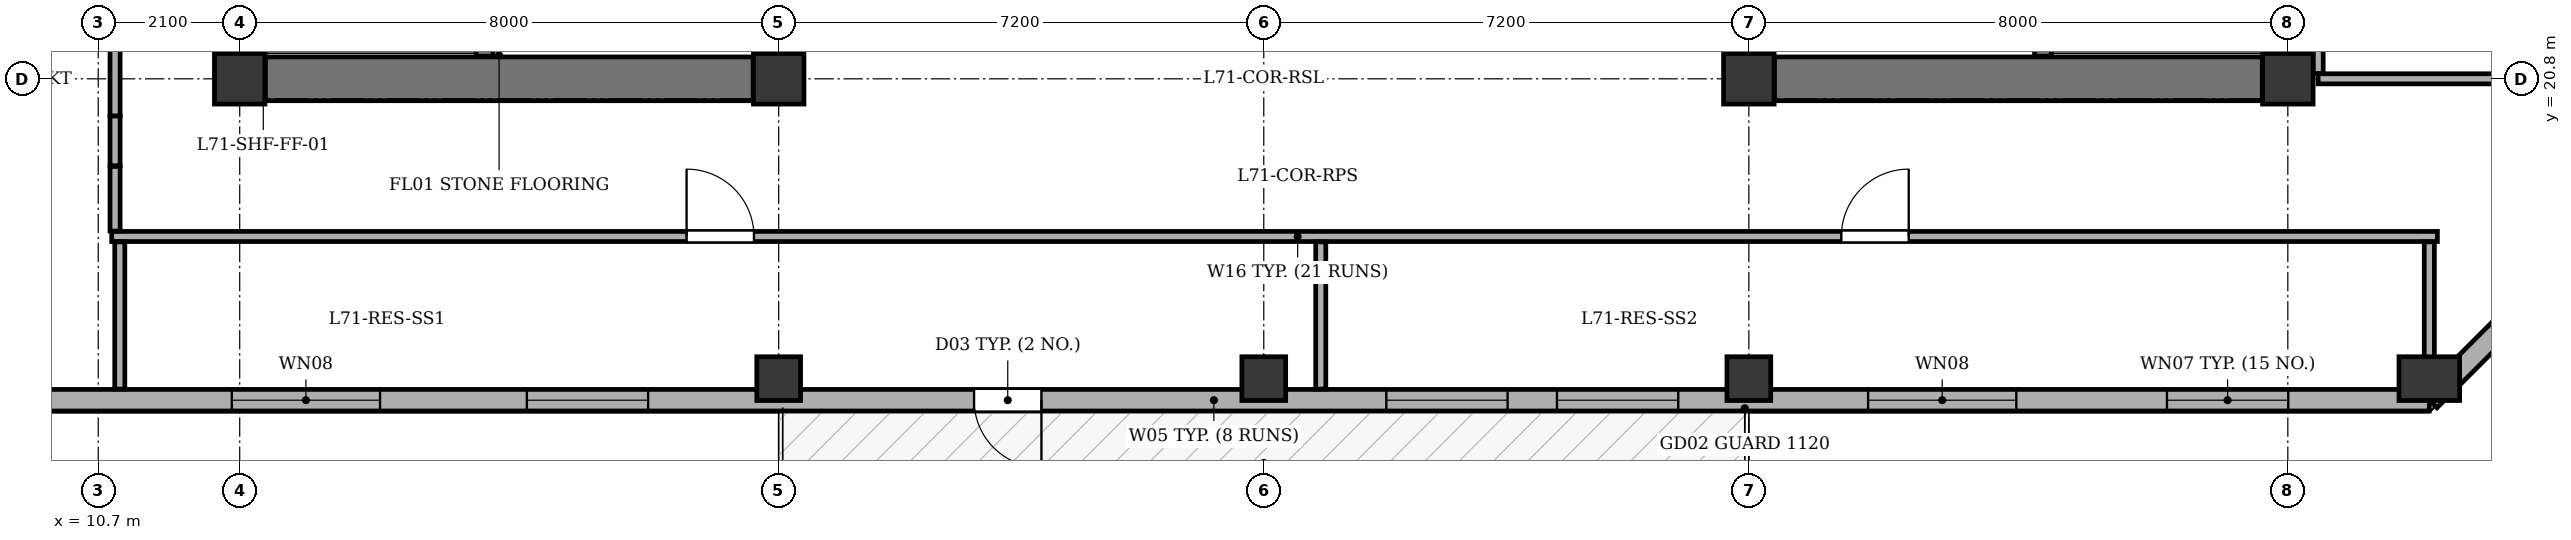
"""IFC4 building model, lengths in metres.
Left out: names, types, materials, properties, quantities, classifications, styles, units other than length and angle.
Written with IfcOpenShell. Run it as: python <this file> out.ifc"""

import sys

from ifc_helpers import new_model, si_unit, direction, frame, frame_2d, origin, origin_2d, place, context, subcontext, project, spatial, rectangle, extrude, element, fill, save


model = new_model("IFC4")
c1 = context("Model", 3, precision=1e-05, world=origin(), true_north=direction((0.0, 1.0)))
c2 = subcontext(c1, "Body", "Model", "MODEL_VIEW")
j1 = project(units=[si_unit("LENGTHUNIT", "METRE"), si_unit("PLANEANGLEUNIT", "RADIAN")], contexts=[c1])
p1 = place(None, origin())
s1 = spatial("IfcSite", under=j1, at=p1, CompositionType="ELEMENT")
p2 = place(p1, origin())
s2 = spatial("IfcBuilding", under=s1, at=p2, CompositionType="ELEMENT")
p3 = place(p2, frame((0.0, 0.0, 268.7)))
s3 = spatial("IfcBuildingStorey", under=s2, at=p3, CompositionType="ELEMENT", Elevation=268.7)
for number, where, z_axis, x_axis in (
    (1, (12.8, 20.8, 0.0), (0.0, 0.0, 1.0), (1.0, 0.0, 0.0)),
    (2, (20.8, 20.8, 0.0), (0.0, 0.0, 1.0), (1.0, 0.0, 0.0)),
    (3, (35.2, 20.8, 0.0), (0.0, 0.0, 1.0), (1.0, 0.0, 0.0)),
    (4, (43.2, 20.8, 0.0), (0.0, 0.0, 1.0), (1.0, 0.0, 0.0)),
):
    element("IfcColumn", number, at=place(p3, frame(where, z_axis=z_axis, x_axis=x_axis)), inside=s3, PredefinedType="COLUMN", context=c2, shape_type="SweptSolid", body=[
        extrude(rectangle(XDim=0.75, YDim=0.75, at=origin_2d()), origin(), (0.0, 0.0, 1.0), 3.4),
    ])
for number, where, z_axis, x_axis in (
    (5, (20.8, 16.35, 0.0), (0.0, 0.0, 1.0), (1.0, 0.0, 0.0)),
    (6, (28.0, 16.35, 0.0), (0.0, 0.0, 1.0), (1.0, 0.0, 0.0)),
    (7, (35.2, 16.35, 0.0), (0.0, 0.0, 1.0), (1.0, 0.0, 0.0)),
):
    element("IfcColumn", number, at=place(p3, frame(where, z_axis=z_axis, x_axis=x_axis)), inside=s3, PredefinedType="COLUMN", context=c2, shape_type="SweptSolid", body=[
        extrude(rectangle(XDim=0.65, YDim=0.65, at=origin_2d()), origin(), (0.0, 0.0, 1.0), 3.4),
    ])
p4 = place(p3, frame((45.3, 16.35, 0.0), z_axis=(0.0, 0.0, 1.0), x_axis=(1.0, 0.0, 0.0)))
e8 = element("IfcColumn", 8, at=p4, inside=s3, PredefinedType="COLUMN", context=c2, shape_type="SweptSolid", body=[
    extrude(rectangle(XDim=0.65, YDim=0.9, at=origin_2d()), origin(), (0.0, 0.0, 1.0), 3.4),
])
p5 = place(p3, frame((45.3, 16.03, 0.0), z_axis=(0.0, 0.0, 1.0), x_axis=(-1.0, 0.0, 0.0)))
e9 = element("IfcWall", 9, at=p5, inside=s3, PredefinedType="STANDARD", context=c2, shape_type="SweptSolid", body=[
    extrude(rectangle(XDim=37.0, YDim=0.32, at=frame_2d((18.5, 0.0))), origin(), (0.0, 0.0, 1.0), 2.725),
])
p6 = place(p5, frame((20.6, 0.0, 0.0)))
e10 = element("IfcOpeningElement", 10, at=p6, cuts=e9, PredefinedType="OPENING", context=c2, shape_type="SweptSolid", body=[
    extrude(rectangle(XDim=1.0, YDim=2.02, at=frame_2d((0.5, 1.01))), frame((0.0, 0.17, 0.0), z_axis=(0.0, -1.0, 0.0), x_axis=(1.0, 0.0, 0.0)), (0.0, 0.0, 1.0), 0.34),
])
p7 = place(p5, frame((2.094, 0.0, 0.75)))
e11 = element("IfcOpeningElement", 11, at=p7, cuts=e9, PredefinedType="OPENING", context=c2, shape_type="SweptSolid", body=[
    extrude(rectangle(XDim=1.8, YDim=1.7, at=frame_2d((0.9, 0.85))), frame((0.0, 0.17, 0.0), z_axis=(0.0, -1.0, 0.0), x_axis=(1.0, 0.0, 0.0)), (0.0, 0.0, 1.0), 0.34),
])
p8 = place(p5, frame((6.13, 0.0, 0.75)))
e12 = element("IfcOpeningElement", 12, at=p8, cuts=e9, PredefinedType="OPENING", context=c2, shape_type="SweptSolid", body=[
    extrude(rectangle(XDim=2.2, YDim=1.7, at=frame_2d((1.1, 0.85))), frame((0.0, 0.17, 0.0), z_axis=(0.0, -1.0, 0.0), x_axis=(1.0, 0.0, 0.0)), (0.0, 0.0, 1.0), 0.34),
])
p9 = place(p5, frame((11.148, 0.0, 0.75)))
e13 = element("IfcOpeningElement", 13, at=p9, cuts=e9, PredefinedType="OPENING", context=c2, shape_type="SweptSolid", body=[
    extrude(rectangle(XDim=1.8, YDim=1.7, at=frame_2d((0.9, 0.85))), frame((0.0, 0.17, 0.0), z_axis=(0.0, -1.0, 0.0), x_axis=(1.0, 0.0, 0.0)), (0.0, 0.0, 1.0), 0.34),
])
p10 = place(p5, frame((13.681, 0.0, 0.75)))
e14 = element("IfcOpeningElement", 14, at=p10, cuts=e9, PredefinedType="OPENING", context=c2, shape_type="SweptSolid", body=[
    extrude(rectangle(XDim=1.8, YDim=1.7, at=frame_2d((0.9, 0.85))), frame((0.0, 0.17, 0.0), z_axis=(0.0, -1.0, 0.0), x_axis=(1.0, 0.0, 0.0)), (0.0, 0.0, 1.0), 0.34),
])
p11 = place(p5, frame((26.438, 0.0, 0.75)))
e15 = element("IfcOpeningElement", 15, at=p11, cuts=e9, PredefinedType="OPENING", context=c2, shape_type="SweptSolid", body=[
    extrude(rectangle(XDim=1.8, YDim=1.7, at=frame_2d((0.9, 0.85))), frame((0.0, 0.17, 0.0), z_axis=(0.0, -1.0, 0.0), x_axis=(1.0, 0.0, 0.0)), (0.0, 0.0, 1.0), 0.34),
])
p12 = place(p5, frame((30.417, 0.0, 0.75)))
e16 = element("IfcOpeningElement", 16, at=p12, cuts=e9, PredefinedType="OPENING", context=c2, shape_type="SweptSolid", body=[
    extrude(rectangle(XDim=2.2, YDim=1.7, at=frame_2d((1.1, 0.85))), frame((0.0, 0.17, 0.0), z_axis=(0.0, -1.0, 0.0), x_axis=(1.0, 0.0, 0.0)), (0.0, 0.0, 1.0), 0.34),
])
p13 = place(p3, frame((49.12, 19.85, 0.0), z_axis=(0.0, 0.0, 1.0), x_axis=(-0.707106781187, -0.707106781187, 0.0)))
e17 = element("IfcWall", 17, at=p13, inside=s3, PredefinedType="STANDARD", context=c2, shape_type="SweptSolid", body=[
    extrude(rectangle(XDim=5.402, YDim=0.32, at=frame_2d((2.701, 0.0))), origin(), (0.0, 0.0, 1.0), 2.725),
])
p14 = place(p13, frame((2.001, 0.0, 0.75)))
e18 = element("IfcOpeningElement", 18, at=p14, cuts=e17, PredefinedType="OPENING", context=c2, shape_type="SweptSolid", body=[
    extrude(rectangle(XDim=1.4, YDim=1.65, at=frame_2d((0.7, 0.825))), frame((0.0, 0.17, 0.0), z_axis=(0.0, -1.0, 0.0), x_axis=(1.0, 0.0, 0.0)), (0.0, 0.0, 1.0), 0.34),
])
p15 = place(p3, frame((12.8, 21.18, 0.0), z_axis=(0.0, 0.0, 1.0), x_axis=(0.0, 1.0, 0.0)))
e19 = element("IfcWall", 19, at=p15, inside=s3, PredefinedType="SHEAR", context=c2, shape_type="SweptSolid", body=[
    extrude(rectangle(XDim=12.04, YDim=0.65, at=frame_2d((6.02, 0.0))), origin(), (0.0, 0.0, 1.0), 3.1),
])
p16 = place(p3, frame((13.18, 20.8, 0.0), z_axis=(0.0, 0.0, 1.0), x_axis=(1.0, 0.0, 0.0)))
e20 = element("IfcWall", 20, at=p16, inside=s3, PredefinedType="SHEAR", context=c2, shape_type="SweptSolid", body=[
    extrude(rectangle(XDim=7.24, YDim=0.65, at=frame_2d((3.62, 0.0))), origin(), (0.0, 0.0, 1.0), 3.1),
])
p17 = place(p3, frame((20.8, 21.18, 0.0), z_axis=(0.0, 0.0, 1.0), x_axis=(0.0, 1.0, 0.0)))
e21 = element("IfcWall", 21, at=p17, inside=s3, PredefinedType="SHEAR", context=c2, shape_type="SweptSolid", body=[
    extrude(rectangle(XDim=3.87, YDim=0.65, at=frame_2d((1.935, 0.0))), origin(), (0.0, 0.0, 1.0), 3.1),
])
p18 = place(p17, frame((1.42, 0.0, 0.0)))
e22 = element("IfcOpeningElement", 22, at=p18, cuts=e21, PredefinedType="OPENING", context=c2, shape_type="SweptSolid", body=[
    extrude(rectangle(XDim=1.2, YDim=2.15, at=frame_2d((0.6, 1.075))), frame((0.0, 0.335, 0.0), z_axis=(0.0, -1.0, 0.0), x_axis=(1.0, 0.0, 0.0)), (0.0, 0.0, 1.0), 0.67),
])
p19 = place(p3, frame((16.435, 21.135, 0.0), z_axis=(0.0, 0.0, 1.0), x_axis=(0.0, 1.0, 0.0)))
e23 = element("IfcWall", 23, at=p19, inside=s3, PredefinedType="SHEAR", context=c2, shape_type="SweptSolid", body=[
    extrude(rectangle(XDim=12.13, YDim=0.25, at=frame_2d((6.065, 0.0))), origin(), (0.0, 0.0, 1.0), 3.1),
])
p20 = place(p19, frame((0.515, 0.0, 0.0)))
e24 = element("IfcOpeningElement", 24, at=p20, cuts=e23, PredefinedType="OPENING", context=c2, shape_type="SweptSolid", body=[
    extrude(rectangle(XDim=1.2, YDim=2.15, at=frame_2d((0.6, 1.075))), frame((0.0, 0.135, 0.0), z_axis=(0.0, -1.0, 0.0), x_axis=(1.0, 0.0, 0.0)), (0.0, 0.0, 1.0), 0.27),
])
p21 = place(p19, frame((2.665, 0.0, 0.0)))
e25 = element("IfcOpeningElement", 25, at=p21, cuts=e23, PredefinedType="OPENING", context=c2, shape_type="SweptSolid", body=[
    extrude(rectangle(XDim=1.15, YDim=2.15, at=frame_2d((0.575, 1.075))), frame((0.0, 0.135, 0.0), z_axis=(0.0, -1.0, 0.0), x_axis=(1.0, 0.0, 0.0)), (0.0, 0.0, 1.0), 0.27),
])
p22 = place(p3, frame((43.2, 21.18, 0.0), z_axis=(0.0, 0.0, 1.0), x_axis=(0.0, 1.0, 0.0)))
e26 = element("IfcWall", 26, at=p22, inside=s3, PredefinedType="SHEAR", context=c2, shape_type="SweptSolid", body=[
    extrude(rectangle(XDim=12.04, YDim=0.65, at=frame_2d((6.02, 0.0))), origin(), (0.0, 0.0, 1.0), 3.1),
])
p23 = place(p3, frame((35.58, 20.8, 0.0), z_axis=(0.0, 0.0, 1.0), x_axis=(1.0, 0.0, 0.0)))
e27 = element("IfcWall", 27, at=p23, inside=s3, PredefinedType="SHEAR", context=c2, shape_type="SweptSolid", body=[
    extrude(rectangle(XDim=7.24, YDim=0.65, at=frame_2d((3.62, 0.0))), origin(), (0.0, 0.0, 1.0), 3.1),
])
p24 = place(p3, frame((35.2, 21.18, 0.0), z_axis=(0.0, 0.0, 1.0), x_axis=(0.0, 1.0, 0.0)))
e28 = element("IfcWall", 28, at=p24, inside=s3, PredefinedType="SHEAR", context=c2, shape_type="SweptSolid", body=[
    extrude(rectangle(XDim=3.87, YDim=0.65, at=frame_2d((1.935, 0.0))), origin(), (0.0, 0.0, 1.0), 3.1),
])
p25 = place(p24, frame((1.42, 0.0, 0.0)))
e29 = element("IfcOpeningElement", 29, at=p25, cuts=e28, PredefinedType="OPENING", context=c2, shape_type="SweptSolid", body=[
    extrude(rectangle(XDim=1.2, YDim=2.15, at=frame_2d((0.6, 1.075))), frame((0.0, 0.335, 0.0), z_axis=(0.0, -1.0, 0.0), x_axis=(1.0, 0.0, 0.0)), (0.0, 0.0, 1.0), 0.67),
])
p26 = place(p3, frame((39.565, 21.135, 0.0), z_axis=(0.0, 0.0, 1.0), x_axis=(0.0, 1.0, 0.0)))
e30 = element("IfcWall", 30, at=p26, inside=s3, PredefinedType="SHEAR", context=c2, shape_type="SweptSolid", body=[
    extrude(rectangle(XDim=12.13, YDim=0.25, at=frame_2d((6.065, 0.0))), origin(), (0.0, 0.0, 1.0), 3.1),
])
p27 = place(p26, frame((0.515, 0.0, 0.0)))
e31 = element("IfcOpeningElement", 31, at=p27, cuts=e30, PredefinedType="OPENING", context=c2, shape_type="SweptSolid", body=[
    extrude(rectangle(XDim=1.2, YDim=2.15, at=frame_2d((0.6, 1.075))), frame((0.0, 0.135, 0.0), z_axis=(0.0, -1.0, 0.0), x_axis=(1.0, 0.0, 0.0)), (0.0, 0.0, 1.0), 0.27),
])
p28 = place(p26, frame((2.665, 0.0, 0.0)))
e32 = element("IfcOpeningElement", 32, at=p28, cuts=e30, PredefinedType="OPENING", context=c2, shape_type="SweptSolid", body=[
    extrude(rectangle(XDim=1.15, YDim=2.15, at=frame_2d((0.575, 1.075))), frame((0.0, 0.135, 0.0), z_axis=(0.0, -1.0, 0.0), x_axis=(1.0, 0.0, 0.0)), (0.0, 0.0, 1.0), 0.27),
])
p29 = place(p3, frame((10.9, 18.46, 0.0), z_axis=(0.0, 0.0, 1.0), x_axis=(1.0, 0.0, 0.0)))
e33 = element("IfcWall", 33, at=p29, inside=s3, PredefinedType="PARTITIONING", context=c2, shape_type="SweptSolid", body=[
    extrude(rectangle(XDim=34.52, YDim=0.15, at=frame_2d((17.26, 0.0))), origin(), (0.0, 0.0, 1.0), 3.1),
])
p30 = place(p29, frame((8.533, 0.0, 0.0)))
e34 = element("IfcOpeningElement", 34, at=p30, cuts=e33, PredefinedType="OPENING", context=c2, shape_type="SweptSolid", body=[
    extrude(rectangle(XDim=1.0, YDim=2.1, at=frame_2d((0.5, 1.05))), frame((0.0, 0.085, 0.0), z_axis=(0.0, -1.0, 0.0), x_axis=(1.0, 0.0, 0.0)), (0.0, 0.0, 1.0), 0.17),
])
p31 = place(p29, frame((25.673, 0.0, 0.0)))
e35 = element("IfcOpeningElement", 35, at=p31, cuts=e33, PredefinedType="OPENING", context=c2, shape_type="SweptSolid", body=[
    extrude(rectangle(XDim=1.0, YDim=2.1, at=frame_2d((0.5, 1.05))), frame((0.0, 0.085, 0.0), z_axis=(0.0, -1.0, 0.0), x_axis=(1.0, 0.0, 0.0)), (0.0, 0.0, 1.0), 0.17),
])
for number, where, z_axis, x_axis in (
    (36, (11.02, 16.195, 0.0), (0.0, 0.0, 1.0), (0.0, 1.0, 0.0)),
    (37, (28.846, 16.195, 0.0), (0.0, 0.0, 1.0), (0.0, 1.0, 0.0)),
    (38, (45.3, 16.195, 0.0), (0.0, 0.0, 1.0), (0.0, 1.0, 0.0)),
):
    element("IfcWall", number, at=place(p3, frame(where, z_axis=z_axis, x_axis=x_axis)), inside=s3, PredefinedType="PARTITIONING", context=c2, shape_type="SweptSolid", body=[
        extrude(rectangle(XDim=2.185, YDim=0.15, at=frame_2d((1.092, 0.0))), origin(), (0.0, 0.0, 1.0), 3.1),
    ])
p32 = place(p3, frame((10.95, 19.5, 0.0), z_axis=(0.0, 0.0, 1.0), x_axis=(0.0, -1.0, 0.0)))
e39 = element("IfcWall", 39, at=p32, inside=s3, PredefinedType="PARTITIONING", context=c2, shape_type="SweptSolid", body=[
    extrude(rectangle(XDim=0.96, YDim=0.15, at=frame_2d((0.48, 0.0))), origin(), (0.0, 0.0, 1.0), 3.1),
])
p33 = place(p3, frame((10.95, 19.51, 0.0), z_axis=(0.0, 0.0, 1.0), x_axis=(0.0, 1.0, 0.0)))
e40 = element("IfcWall", 40, at=p33, inside=s3, PredefinedType="PARTITIONING", context=c2, shape_type="SweptSolid", body=[
    extrude(rectangle(XDim=0.74, YDim=0.15, at=frame_2d((0.37, 0.0))), origin(), (0.0, 0.0, 1.0), 3.1),
])
p34 = place(p3, frame((10.95, 20.25, 0.0), z_axis=(0.0, 0.0, 1.0), x_axis=(0.0, 1.0, 0.0)))
e41 = element("IfcWall", 41, at=p34, inside=s3, PredefinedType="PARTITIONING", context=c2, shape_type="SweptSolid", body=[
    extrude(rectangle(XDim=13.9, YDim=0.15, at=frame_2d((6.95, 0.0))), origin(), (0.0, 0.0, 1.0), 3.1),
])
p35 = place(p3, frame((43.65, 20.8, 0.0), z_axis=(0.0, 0.0, 1.0), x_axis=(1.0, 0.0, 0.0)))
e42 = element("IfcWall", 42, at=p35, inside=s3, PredefinedType="PARTITIONING", context=c2, shape_type="SweptSolid", body=[
    extrude(rectangle(XDim=5.305, YDim=0.15, at=frame_2d((2.653, 0.0))), origin(), (0.0, 0.0, 1.0), 2.535),
])
p36 = place(p3, frame((43.65, 20.88, 0.0), z_axis=(0.0, 0.0, 1.0), x_axis=(0.0, 1.0, 0.0)))
e43 = element("IfcWall", 43, at=p36, inside=s3, PredefinedType="PARTITIONING", context=c2, shape_type="SweptSolid", body=[
    extrude(rectangle(XDim=13.27, YDim=0.15, at=frame_2d((6.635, 0.0))), origin(), (0.0, 0.0, 1.0), 3.1),
])
p37 = place(p6, origin())
e44 = element("IfcDoor", 44, at=p37, inside=s3, OperationType="SINGLE_SWING_LEFT", PredefinedType="DOOR", context=c2, shape_type="SweptSolid", body=[
    extrude(rectangle(XDim=1.0, YDim=2.02, at=frame_2d((0.5, 1.01))), frame((0.0, 0.025, 0.0), z_axis=(0.0, -1.0, 0.0), x_axis=(1.0, 0.0, 0.0)), (0.0, 0.0, 1.0), 0.05),
])
fill(e10, e44)
p38 = place(p7, origin())
e45 = element("IfcWindow", 45, at=p38, inside=s3, PartitioningType="SINGLE_PANEL", PredefinedType="WINDOW", context=c2, shape_type="SweptSolid", body=[
    extrude(rectangle(XDim=1.8, YDim=1.7, at=frame_2d((0.9, 0.85))), frame((0.0, -0.01, 0.0), z_axis=(0.0, -1.0, 0.0), x_axis=(1.0, 0.0, 0.0)), (0.0, 0.0, 1.0), 0.06),
])
fill(e11, e45)
p39 = place(p8, origin())
e46 = element("IfcWindow", 46, at=p39, inside=s3, PartitioningType="SINGLE_PANEL", PredefinedType="WINDOW", context=c2, shape_type="SweptSolid", body=[
    extrude(rectangle(XDim=2.2, YDim=1.7, at=frame_2d((1.1, 0.85))), frame((0.0, -0.01, 0.0), z_axis=(0.0, -1.0, 0.0), x_axis=(1.0, 0.0, 0.0)), (0.0, 0.0, 1.0), 0.06),
])
fill(e12, e46)
p40 = place(p9, origin())
e47 = element("IfcWindow", 47, at=p40, inside=s3, PartitioningType="SINGLE_PANEL", PredefinedType="WINDOW", context=c2, shape_type="SweptSolid", body=[
    extrude(rectangle(XDim=1.8, YDim=1.7, at=frame_2d((0.9, 0.85))), frame((0.0, -0.01, 0.0), z_axis=(0.0, -1.0, 0.0), x_axis=(1.0, 0.0, 0.0)), (0.0, 0.0, 1.0), 0.06),
])
fill(e13, e47)
p41 = place(p10, origin())
e48 = element("IfcWindow", 48, at=p41, inside=s3, PartitioningType="SINGLE_PANEL", PredefinedType="WINDOW", context=c2, shape_type="SweptSolid", body=[
    extrude(rectangle(XDim=1.8, YDim=1.7, at=frame_2d((0.9, 0.85))), frame((0.0, -0.01, 0.0), z_axis=(0.0, -1.0, 0.0), x_axis=(1.0, 0.0, 0.0)), (0.0, 0.0, 1.0), 0.06),
])
fill(e14, e48)
p42 = place(p11, origin())
e49 = element("IfcWindow", 49, at=p42, inside=s3, PartitioningType="SINGLE_PANEL", PredefinedType="WINDOW", context=c2, shape_type="SweptSolid", body=[
    extrude(rectangle(XDim=1.8, YDim=1.7, at=frame_2d((0.9, 0.85))), frame((0.0, -0.01, 0.0), z_axis=(0.0, -1.0, 0.0), x_axis=(1.0, 0.0, 0.0)), (0.0, 0.0, 1.0), 0.06),
])
fill(e15, e49)
p43 = place(p12, origin())
e50 = element("IfcWindow", 50, at=p43, inside=s3, PartitioningType="SINGLE_PANEL", PredefinedType="WINDOW", context=c2, shape_type="SweptSolid", body=[
    extrude(rectangle(XDim=2.2, YDim=1.7, at=frame_2d((1.1, 0.85))), frame((0.0, -0.01, 0.0), z_axis=(0.0, -1.0, 0.0), x_axis=(1.0, 0.0, 0.0)), (0.0, 0.0, 1.0), 0.06),
])
fill(e16, e50)
p44 = place(p30, origin())
e51 = element("IfcDoor", 51, at=p44, inside=s3, OperationType="SINGLE_SWING_LEFT", PredefinedType="DOOR", context=c2, shape_type="SweptSolid", body=[
    extrude(rectangle(XDim=1.0, YDim=2.1, at=frame_2d((0.5, 1.05))), frame((0.0, 0.025, 0.0), z_axis=(0.0, -1.0, 0.0), x_axis=(1.0, 0.0, 0.0)), (0.0, 0.0, 1.0), 0.05),
])
fill(e34, e51)
p45 = place(p31, origin())
e52 = element("IfcDoor", 52, at=p45, inside=s3, OperationType="SINGLE_SWING_RIGHT", PredefinedType="DOOR", context=c2, shape_type="SweptSolid", body=[
    extrude(rectangle(XDim=1.0, YDim=2.1, at=frame_2d((0.5, 1.05))), frame((0.0, 0.025, 0.0), z_axis=(0.0, -1.0, 0.0), x_axis=(1.0, 0.0, 0.0)), (0.0, 0.0, 1.0), 0.05),
])
fill(e35, e52)
save(model, sys.argv[1])
